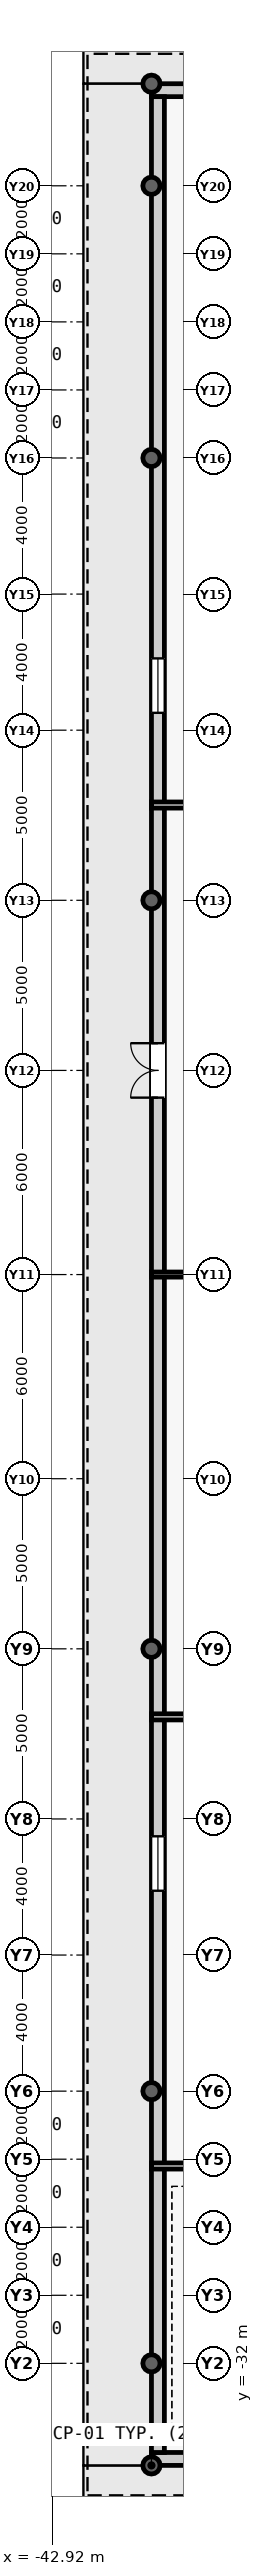
"""IFC4 building model, lengths in metres.
Left out: names, types, materials, properties, quantities, classifications, styles, units other than length and angle.
Written with IfcOpenShell. Run it as: python <this file> out.ifc"""

import sys

from ifc_helpers import new_model, si_unit, direction, frame, frame_2d, origin, origin_2d, place, context, subcontext, project, spatial, rectangle, hollow_circle, extrude, source, transform, mapped, element, fill, save


model = new_model("IFC4")
c1 = context("Model", 3, precision=1e-05, world=origin(), true_north=direction((0.0, 1.0)))
c2 = subcontext(c1, "Body", "Model", "MODEL_VIEW")
j1 = project(units=[si_unit("LENGTHUNIT", "METRE"), si_unit("PLANEANGLEUNIT", "RADIAN")], contexts=[c1])
p1 = place(None, origin())
s1 = spatial("IfcSite", under=j1, at=p1, CompositionType="ELEMENT")
p2 = place(p1, origin())
s2 = spatial("IfcBuilding", under=s1, at=p2, CompositionType="ELEMENT")
p3 = place(p2, frame((0.0, 0.0, 17.4)))
s3 = spatial("IfcBuildingStorey", under=s2, at=p3, CompositionType="ELEMENT", Elevation=17.4)
m1 = source(origin(), c2, "Body", "SweptSolid", [
    extrude(hollow_circle(Radius=0.254, WallThickness=0.025, at=origin_2d()), origin(), (0.0, 0.0, 1.0), 4.8),
])
for number, where, z_axis, x_axis in (
    (1, (-40.0, -35.0, 0.0), (0.0, 0.0, 1.0), (1.0, 0.0, 0.0)),
    (2, (-40.0, -24.0, 0.0), (0.0, 0.0, 1.0), (1.0, 0.0, 0.0)),
    (3, (-40.0, -11.0, 0.0), (0.0, 0.0, 1.0), (1.0, 0.0, 0.0)),
    (4, (-40.0, 11.0, 0.0), (0.0, 0.0, 1.0), (1.0, 0.0, 0.0)),
    (5, (-40.0, 24.0, 0.0), (0.0, 0.0, 1.0), (1.0, 0.0, 0.0)),
    (6, (-40.0, 35.0, 0.0), (0.0, 0.0, 1.0), (1.0, 0.0, 0.0)),
    (7, (-40.0, -32.0, 0.0), (0.0, 0.0, 1.0), (1.0, 0.0, 0.0)),
    (8, (-40.0, 32.0, 0.0), (0.0, 0.0, 1.0), (1.0, 0.0, 0.0)),
):
    element("IfcColumn", number, at=place(p3, frame(where, z_axis=z_axis, x_axis=x_axis)), inside=s3, PredefinedType="COLUMN", context=c2, shape_type="MappedRepresentation", body=[
        mapped(m1, transform((0.0, 0.0, 0.0), scale=1.0)),
    ])
m2 = source(origin(), c2, "Body", "SweptSolid", [
    extrude(rectangle(XDim=30.0, YDim=0.38, at=frame_2d((15.0, 0.0))), origin(), (0.0, 0.0, 1.0), 2.68),
])
p4 = place(p3, frame((-40.0, -34.81, 0.0), z_axis=(0.0, 0.0, 1.0), x_axis=(1.0, 0.0, 0.0)))
e9 = element("IfcWall", 9, at=p4, inside=s3, PredefinedType="STANDARD", context=c2, shape_type="MappedRepresentation", body=[
    mapped(m2, transform((0.0, 0.0, 0.0), scale=1.0)),
])
m3 = source(origin(), c2, "Body", "SweptSolid", [
    extrude(rectangle(XDim=1.6, YDim=2.25, at=frame_2d((0.8, 1.125))), frame((0.0, 0.2, 0.0), z_axis=(0.0, -1.0, 0.0), x_axis=(1.0, 0.0, 0.0)), (0.0, 0.0, 1.0), 0.4),
])
p5 = place(p4, frame((12.2, 0.0, 0.0)))
e10 = element("IfcOpeningElement", 10, at=p5, cuts=e9, PredefinedType="OPENING", context=c2, shape_type="MappedRepresentation", body=[
    mapped(m3, transform((0.0, 0.0, 0.0), scale=1.0)),
])
m4 = source(origin(), c2, "Body", "SweptSolid", [
    extrude(rectangle(XDim=1.6, YDim=1.96, at=frame_2d((0.8, 0.98))), frame((0.0, 0.2, 0.0), z_axis=(0.0, -1.0, 0.0), x_axis=(1.0, 0.0, 0.0)), (0.0, 0.0, 1.0), 0.4),
])
p6 = place(p4, frame((21.7, 0.0, 0.5)))
e11 = element("IfcOpeningElement", 11, at=p6, cuts=e9, PredefinedType="OPENING", context=c2, shape_type="MappedRepresentation", body=[
    mapped(m4, transform((0.0, 0.0, 0.0), scale=1.0)),
])
p7 = place(p3, frame((-40.0, 34.81, 0.0), z_axis=(0.0, 0.0, 1.0), x_axis=(1.0, 0.0, 0.0)))
e12 = element("IfcWall", 12, at=p7, inside=s3, PredefinedType="STANDARD", context=c2, shape_type="MappedRepresentation", body=[
    mapped(m2, transform((0.0, 0.0, 0.0), scale=1.0)),
])
p8 = place(p7, frame((12.2, 0.0, 0.0)))
e13 = element("IfcOpeningElement", 13, at=p8, cuts=e12, PredefinedType="OPENING", context=c2, shape_type="MappedRepresentation", body=[
    mapped(m3, transform((0.0, 0.0, 0.0), scale=1.0)),
])
p9 = place(p7, frame((21.7, 0.0, 0.5)))
e14 = element("IfcOpeningElement", 14, at=p9, cuts=e12, PredefinedType="OPENING", context=c2, shape_type="MappedRepresentation", body=[
    mapped(m4, transform((0.0, 0.0, 0.0), scale=1.0)),
])
m5 = source(origin(), c2, "Body", "SweptSolid", [
    extrude(rectangle(XDim=69.24, YDim=0.38, at=frame_2d((34.62, 0.0))), origin(), (0.0, 0.0, 1.0), 2.68),
])
p10 = place(p3, frame((-39.81, -34.62, 0.0), z_axis=(0.0, 0.0, 1.0), x_axis=(0.0, 1.0, 0.0)))
e15 = element("IfcWall", 15, at=p10, inside=s3, PredefinedType="STANDARD", context=c2, shape_type="MappedRepresentation", body=[
    mapped(m5, transform((0.0, 0.0, 0.0), scale=1.0)),
])
p11 = place(p10, frame((39.82, 0.0, 0.0)))
e16 = element("IfcOpeningElement", 16, at=p11, cuts=e15, PredefinedType="OPENING", context=c2, shape_type="MappedRepresentation", body=[
    mapped(m3, transform((0.0, 0.0, 0.0), scale=1.0)),
])
p12 = place(p10, frame((16.51, 0.0, 0.5)))
e17 = element("IfcOpeningElement", 17, at=p12, cuts=e15, PredefinedType="OPENING", context=c2, shape_type="MappedRepresentation", body=[
    mapped(m4, transform((0.0, 0.0, 0.0), scale=1.0)),
])
p13 = place(p10, frame((51.13, 0.0, 0.5)))
e18 = element("IfcOpeningElement", 18, at=p13, cuts=e15, PredefinedType="OPENING", context=c2, shape_type="MappedRepresentation", body=[
    mapped(m4, transform((0.0, 0.0, 0.0), scale=1.0)),
])
m6 = source(origin(), c2, "Body", "SweptSolid", [
    extrude(rectangle(XDim=80.0, YDim=0.18, at=frame_2d((40.0, 0.0))), origin(), (0.0, 0.0, 1.0), 4.48),
])
p14 = place(p3, frame((-40.0, -26.2, 0.0), z_axis=(0.0, 0.0, 1.0), x_axis=(1.0, 0.0, 0.0)))
e19 = element("IfcWall", 19, at=p14, inside=s3, PredefinedType="PARTITIONING", context=c2, shape_type="MappedRepresentation", body=[
    mapped(m6, transform((0.0, 0.0, 0.0), scale=1.0)),
])
m7 = source(origin(), c2, "Body", "SweptSolid", [
    extrude(rectangle(XDim=1.05, YDim=2.2, at=frame_2d((0.525, 1.1))), frame((0.0, 0.1, 0.0), z_axis=(0.0, -1.0, 0.0), x_axis=(1.0, 0.0, 0.0)), (0.0, 0.0, 1.0), 0.2),
])
p15 = place(p14, frame((17.725, 0.0, 0.0)))
e20 = element("IfcOpeningElement", 20, at=p15, cuts=e19, PredefinedType="OPENING", context=c2, shape_type="MappedRepresentation", body=[
    mapped(m7, transform((0.0, 0.0, 0.0), scale=1.0)),
])
p16 = place(p14, frame((36.475, 0.0, 0.0)))
e21 = element("IfcOpeningElement", 21, at=p16, cuts=e19, PredefinedType="OPENING", context=c2, shape_type="MappedRepresentation", body=[
    mapped(m7, transform((0.0, 0.0, 0.0), scale=1.0)),
])
p17 = place(p14, frame((58.225, 0.0, 0.0)))
e22 = element("IfcOpeningElement", 22, at=p17, cuts=e19, PredefinedType="OPENING", context=c2, shape_type="MappedRepresentation", body=[
    mapped(m7, transform((0.0, 0.0, 0.0), scale=1.0)),
])
p18 = place(p3, frame((-40.0, 13.8, 0.0), z_axis=(0.0, 0.0, 1.0), x_axis=(1.0, 0.0, 0.0)))
e23 = element("IfcWall", 23, at=p18, inside=s3, PredefinedType="PARTITIONING", context=c2, shape_type="MappedRepresentation", body=[
    mapped(m6, transform((0.0, 0.0, 0.0), scale=1.0)),
])
p19 = place(p18, frame((21.725, 0.0, 0.0)))
e24 = element("IfcOpeningElement", 24, at=p19, cuts=e23, PredefinedType="OPENING", context=c2, shape_type="MappedRepresentation", body=[
    mapped(m7, transform((0.0, 0.0, 0.0), scale=1.0)),
])
p20 = place(p18, frame((44.475, 0.0, 0.0)))
e25 = element("IfcOpeningElement", 25, at=p20, cuts=e23, PredefinedType="OPENING", context=c2, shape_type="MappedRepresentation", body=[
    mapped(m7, transform((0.0, 0.0, 0.0), scale=1.0)),
])
p21 = place(p18, frame((62.225, 0.0, 0.0)))
e26 = element("IfcOpeningElement", 26, at=p21, cuts=e23, PredefinedType="OPENING", context=c2, shape_type="MappedRepresentation", body=[
    mapped(m7, transform((0.0, 0.0, 0.0), scale=1.0)),
])
m8 = source(origin(), c2, "Body", "SweptSolid", [
    extrude(rectangle(XDim=21.8, YDim=0.18, at=frame_2d((10.9, 0.0))), origin(), (0.0, 0.0, 1.0), 4.48),
])
p22 = place(p3, frame((-40.0, -13.0, 0.0), z_axis=(0.0, 0.0, 1.0), x_axis=(1.0, 0.0, 0.0)))
e27 = element("IfcWall", 27, at=p22, inside=s3, PredefinedType="PARTITIONING", context=c2, shape_type="MappedRepresentation", body=[
    mapped(m8, transform((0.0, 0.0, 0.0), scale=1.0)),
])
m9 = source(origin(), c2, "Body", "SweptSolid", [
    extrude(rectangle(XDim=21.8, YDim=0.15, at=frame_2d((10.9, 0.0))), origin(), (0.0, 0.0, 1.0), 2.68),
])
p23 = place(p3, frame((-40.0, 0.0, 0.0), z_axis=(0.0, 0.0, 1.0), x_axis=(1.0, 0.0, 0.0)))
e28 = element("IfcWall", 28, at=p23, inside=s3, PredefinedType="PARTITIONING", context=c2, shape_type="MappedRepresentation", body=[
    mapped(m9, transform((0.0, 0.0, 0.0), scale=1.0)),
])
m10 = source(origin(), c2, "Body", "SweptSolid", [
    extrude(rectangle(XDim=1.6, YDim=2.25, at=frame_2d((0.8, 1.125))), frame((0.0, 0.025, 0.0), z_axis=(0.0, -1.0, 0.0), x_axis=(1.0, 0.0, 0.0)), (0.0, 0.0, 1.0), 0.05),
])
p24 = place(p11, origin())
e29 = element("IfcDoor", 29, at=p24, inside=s3, OperationType="DOUBLE_DOOR_SINGLE_SWING", PredefinedType="DOOR", context=c2, shape_type="MappedRepresentation", body=[
    mapped(m10, transform((0.0, 0.0, 0.0), scale=1.0)),
])
fill(e16, e29)
m11 = source(origin(), c2, "Body", "SweptSolid", [
    extrude(rectangle(XDim=1.6, YDim=1.96, at=frame_2d((0.8, 0.98))), frame((0.0, 0.03, 0.0), z_axis=(0.0, -1.0, 0.0), x_axis=(1.0, 0.0, 0.0)), (0.0, 0.0, 1.0), 0.06),
])
p25 = place(p12, origin())
e30 = element("IfcWindow", 30, at=p25, inside=s3, PartitioningType="SINGLE_PANEL", PredefinedType="WINDOW", context=c2, shape_type="MappedRepresentation", body=[
    mapped(m11, transform((0.0, 0.0, 0.0), scale=1.0)),
])
fill(e17, e30)
p26 = place(p13, origin())
e31 = element("IfcWindow", 31, at=p26, inside=s3, PartitioningType="SINGLE_PANEL", PredefinedType="WINDOW", context=c2, shape_type="MappedRepresentation", body=[
    mapped(m11, transform((0.0, 0.0, 0.0), scale=1.0)),
])
fill(e18, e31)
save(model, sys.argv[1])
